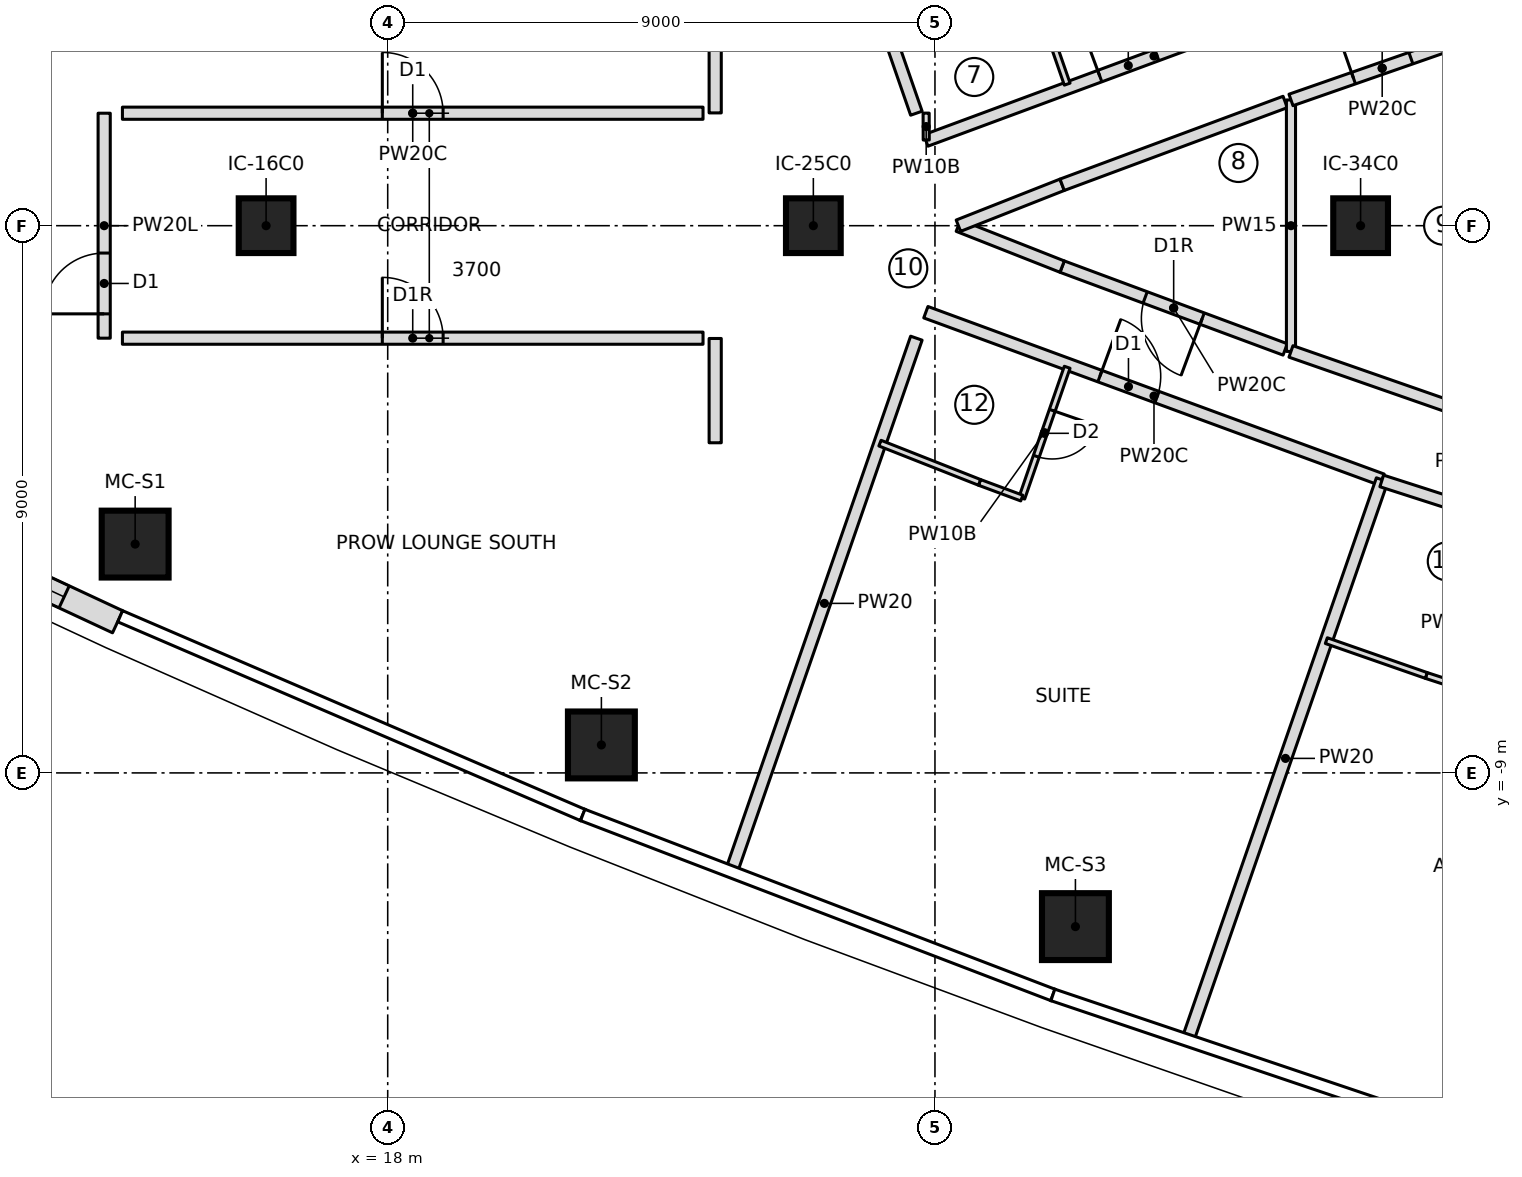
"""IFC4 building model, lengths in metres.
Left out: names, types, materials, properties, quantities, classifications, styles, units other than length and angle.
Written with IfcOpenShell. Run it as: python <this file> out.ifc"""

import sys

from ifc_helpers import new_model, si_unit, direction, frame, frame_2d, origin, origin_2d, place, context, subcontext, project, spatial, polyline, rectangle, outline, extrude, element, fill, save


model = new_model("IFC4")
c1 = context("Model", 3, precision=1e-05, world=origin(), true_north=direction((0.0, 1.0)))
c2 = subcontext(c1, "Body", "Model", "MODEL_VIEW")
j1 = project(units=[si_unit("LENGTHUNIT", "METRE"), si_unit("PLANEANGLEUNIT", "RADIAN")], contexts=[c1])
p1 = place(None, origin())
s1 = spatial("IfcSite", under=j1, at=p1, CompositionType="ELEMENT")
p2 = place(p1, origin())
s2 = spatial("IfcBuilding", under=s1, at=p2, CompositionType="ELEMENT")
p3 = place(p2, frame((0.0, 0.0, 299.85)))
s3 = spatial("IfcBuildingStorey", under=s2, at=p3, CompositionType="ELEMENT", Elevation=299.85)
for number, where, z_axis, x_axis in (
    (1, (13.846, -5.237, 0.0), (0.0, 0.0, 1.0), (1.0, 0.0, 0.0)),
    (2, (21.514, -8.54, 0.0), (0.0, 0.0, 1.0), (1.0, 0.0, 0.0)),
    (3, (29.31, -11.528, 0.0), (0.0, 0.0, 1.0), (1.0, 0.0, 0.0)),
):
    element("IfcColumn", number, at=place(p3, frame(where, z_axis=z_axis, x_axis=x_axis)), inside=s3, PredefinedType="COLUMN", context=c2, shape_type="SweptSolid", body=[
        extrude(rectangle(XDim=1.1, YDim=1.1, at=origin_2d()), origin(), (0.0, 0.0, 1.0), 3.55),
    ])
for number, where, z_axis, x_axis in (
    (4, (16.0, 0.0, 0.0), (0.0, 0.0, 1.0), (1.0, 0.0, 0.0)),
    (5, (25.0, 0.0, 0.0), (0.0, 0.0, 1.0), (1.0, 0.0, 0.0)),
    (6, (34.0, 0.0, 0.0), (0.0, 0.0, 1.0), (1.0, 0.0, 0.0)),
):
    element("IfcColumn", number, at=place(p3, frame(where, z_axis=z_axis, x_axis=x_axis)), inside=s3, PredefinedType="COLUMN", context=c2, shape_type="SweptSolid", body=[
        extrude(rectangle(XDim=0.9, YDim=0.9, at=origin_2d()), origin(), (0.0, 0.0, 1.0), 3.55),
    ])
p4 = place(p3, frame((9.804, -4.766, 0.0), z_axis=(0.0, 0.0, 1.0), x_axis=(0.906485602396, -0.42223672584, 0.0)))
e7 = element("IfcWall", 7, at=p4, inside=s3, PredefinedType="NOTDEFINED", context=c2, shape_type="SweptSolid", body=[
    extrude(outline(polyline([(-0.039, -0.2), (4.142, -0.2), (4.142, 0.2), (0.039, 0.2), (-0.039, -0.2)])), origin(), (0.0, 0.0, 1.0), 3.25),
])
p5 = place(p4, frame((0.971, 0.0, 0.6)))
e8 = element("IfcOpeningElement", 8, at=p5, cuts=e7, PredefinedType="OPENING", context=c2, shape_type="SweptSolid", body=[
    extrude(outline(polyline([(0.0, 1.35), (0.084, 1.771), (0.322, 2.128), (0.679, 2.366), (1.1, 2.45), (1.521, 2.366), (1.878, 2.128), (2.116, 1.771), (2.2, 1.35), (2.2, 1.1), (2.116, 0.679), (1.878, 0.322), (1.521, 0.084), (1.1, 0.0), (0.679, 0.084), (0.322, 0.322), (0.084, 0.679), (0.0, 1.1), (0.0, 1.35)])), frame((0.0, 0.21, 0.0), z_axis=(0.0, -1.0, 0.0), x_axis=(1.0, 0.0, 0.0)), (0.0, 0.0, 1.0), 0.42),
])
p6 = place(p3, frame((13.637, 1.85, 0.0), z_axis=(0.0, 0.0, 1.0), x_axis=(1.0, 0.0, 0.0)))
e9 = element("IfcWall", 9, at=p6, inside=s3, PredefinedType="PARTITIONING", context=c2, shape_type="SweptSolid", body=[
    extrude(rectangle(XDim=9.549, YDim=0.2, at=frame_2d((4.774, 0.0))), origin(), (0.0, 0.0, 1.0), 3.15),
])
p7 = place(p6, frame((4.274, 0.0, 0.0)))
e10 = element("IfcOpeningElement", 10, at=p7, cuts=e9, PredefinedType="OPENING", context=c2, shape_type="SweptSolid", body=[
    extrude(rectangle(XDim=1.0, YDim=2.1, at=frame_2d((0.5, 1.05))), frame((0.0, 0.11, 0.0), z_axis=(0.0, -1.0, 0.0), x_axis=(1.0, 0.0, 0.0)), (0.0, 0.0, 1.0), 0.22),
])
p8 = place(p3, frame((13.637, -1.85, 0.0), z_axis=(0.0, 0.0, 1.0), x_axis=(1.0, 0.0, 0.0)))
e11 = element("IfcWall", 11, at=p8, inside=s3, PredefinedType="PARTITIONING", context=c2, shape_type="SweptSolid", body=[
    extrude(rectangle(XDim=9.549, YDim=0.2, at=frame_2d((4.774, 0.0))), origin(), (0.0, 0.0, 1.0), 3.15),
])
p9 = place(p8, frame((4.274, 0.0, 0.0)))
e12 = element("IfcOpeningElement", 12, at=p9, cuts=e11, PredefinedType="OPENING", context=c2, shape_type="SweptSolid", body=[
    extrude(rectangle(XDim=1.0, YDim=2.1, at=frame_2d((0.5, 1.05))), frame((0.0, 0.11, 0.0), z_axis=(0.0, -1.0, 0.0), x_axis=(1.0, 0.0, 0.0)), (0.0, 0.0, 1.0), 0.22),
])
p10 = place(p3, frame((13.337, -1.85, 0.0), z_axis=(0.0, 0.0, 1.0), x_axis=(0.0, 1.0, 0.0)))
e13 = element("IfcWall", 13, at=p10, inside=s3, PredefinedType="PARTITIONING", context=c2, shape_type="SweptSolid", body=[
    extrude(rectangle(XDim=3.7, YDim=0.2, at=frame_2d((1.85, 0.0))), origin(), (0.0, 0.0, 1.0), 3.15),
])
p11 = place(p10, frame((0.4, 0.0, 0.0)))
e14 = element("IfcOpeningElement", 14, at=p11, cuts=e13, PredefinedType="OPENING", context=c2, shape_type="SweptSolid", body=[
    extrude(rectangle(XDim=1.0, YDim=2.1, at=frame_2d((0.5, 1.05))), frame((0.0, 0.11, 0.0), z_axis=(0.0, -1.0, 0.0), x_axis=(1.0, 0.0, 0.0)), (0.0, 0.0, 1.0), 0.22),
])
p12 = place(p3, frame((26.694, 1.85, 0.0), z_axis=(0.0, 0.0, 1.0), x_axis=(-0.327714422317, 0.944776829418, 0.0)))
e15 = element("IfcWall", 15, at=p12, inside=s3, PredefinedType="PARTITIONING", context=c2, shape_type="SweptSolid", body=[
    extrude(rectangle(XDim=9.233, YDim=0.2, at=frame_2d((4.617, 0.0))), origin(), (0.0, 0.0, 1.0), 3.15),
])
p13 = place(p3, frame((26.85, 1.401, 0.0), z_axis=(0.0, 0.0, 1.0), x_axis=(0.937815361849, 0.34713447982, 0.0)))
e16 = element("IfcWall", 16, at=p13, inside=s3, PredefinedType="PARTITIONING", context=c2, shape_type="SweptSolid", body=[
    extrude(rectangle(XDim=8.001, YDim=0.2, at=frame_2d((4.001, 0.0))), origin(), (0.0, 0.0, 1.0), 3.15),
])
p14 = place(p13, frame((3.05, 0.0, 0.0)))
e17 = element("IfcOpeningElement", 17, at=p14, cuts=e16, PredefinedType="OPENING", context=c2, shape_type="SweptSolid", body=[
    extrude(rectangle(XDim=1.0, YDim=2.1, at=frame_2d((0.5, 1.05))), frame((0.0, 0.11, 0.0), z_axis=(0.0, -1.0, 0.0), x_axis=(1.0, 0.0, 0.0)), (0.0, 0.0, 1.0), 0.22),
])
p15 = place(p3, frame((28.428, 4.48, 0.0), z_axis=(0.0, 0.0, 1.0), x_axis=(0.327718024288, -0.944775579996, 0.0)))
e18 = element("IfcWall", 18, at=p15, inside=s3, PredefinedType="PARTITIONING", context=c2, shape_type="SweptSolid", body=[
    extrude(rectangle(XDim=2.277, YDim=0.1, at=frame_2d((1.139, 0.0))), origin(), (0.0, 0.0, 1.0), 3.15),
])
p16 = place(p15, frame((0.75, 0.0, 0.0)))
e19 = element("IfcOpeningElement", 19, at=p16, cuts=e18, PredefinedType="OPENING", context=c2, shape_type="SweptSolid", body=[
    extrude(rectangle(XDim=0.8, YDim=2.1, at=frame_2d((0.4, 1.05))), frame((0.0, 0.06, 0.0), z_axis=(0.0, -1.0, 0.0), x_axis=(1.0, 0.0, 0.0)), (0.0, 0.0, 1.0), 0.12),
])
p17 = place(p3, frame((23.668, -10.573, 0.0), z_axis=(0.0, 0.0, 1.0), x_axis=(0.327714422317, 0.944776829418, 0.0)))
e20 = element("IfcWall", 20, at=p17, inside=s3, PredefinedType="PARTITIONING", context=c2, shape_type="SweptSolid", body=[
    extrude(rectangle(XDim=9.233, YDim=0.2, at=frame_2d((4.617, 0.0))), origin(), (0.0, 0.0, 1.0), 3.15),
])
p18 = place(p3, frame((26.85, -1.423, 0.0), z_axis=(0.0, 0.0, 1.0), x_axis=(0.938687309179, -0.344769684843, 0.0)))
e21 = element("IfcWall", 21, at=p18, inside=s3, PredefinedType="PARTITIONING", context=c2, shape_type="SweptSolid", body=[
    extrude(rectangle(XDim=7.994, YDim=0.2, at=frame_2d((3.997, 0.0))), origin(), (0.0, 0.0, 1.0), 3.15),
])
p19 = place(p18, frame((3.05, 0.0, 0.0)))
e22 = element("IfcOpeningElement", 22, at=p19, cuts=e21, PredefinedType="OPENING", context=c2, shape_type="SweptSolid", body=[
    extrude(rectangle(XDim=1.0, YDim=2.1, at=frame_2d((0.5, 1.05))), frame((0.0, 0.11, 0.0), z_axis=(0.0, -1.0, 0.0), x_axis=(1.0, 0.0, 0.0)), (0.0, 0.0, 1.0), 0.22),
])
p20 = place(p3, frame((29.175, -2.328, 0.0), z_axis=(0.0, 0.0, 1.0), x_axis=(-0.327718024288, -0.944775579996, 0.0)))
e23 = element("IfcWall", 23, at=p20, inside=s3, PredefinedType="PARTITIONING", context=c2, shape_type="SweptSolid", body=[
    extrude(rectangle(XDim=2.277, YDim=0.1, at=frame_2d((1.139, 0.0))), origin(), (0.0, 0.0, 1.0), 3.15),
])
p21 = place(p20, frame((0.75, 0.0, 0.0)))
e24 = element("IfcOpeningElement", 24, at=p21, cuts=e23, PredefinedType="OPENING", context=c2, shape_type="SweptSolid", body=[
    extrude(rectangle(XDim=0.8, YDim=2.1, at=frame_2d((0.4, 1.05))), frame((0.0, 0.06, 0.0), z_axis=(0.0, -1.0, 0.0), x_axis=(1.0, 0.0, 0.0)), (0.0, 0.0, 1.0), 0.12),
])
p22 = place(p3, frame((28.428, -4.48, 0.0), z_axis=(0.0, 0.0, 1.0), x_axis=(-0.937514267289, 0.347946833049, 0.0)))
e25 = element("IfcWall", 25, at=p22, inside=s3, PredefinedType="PARTITIONING", context=c2, shape_type="SweptSolid", body=[
    extrude(rectangle(XDim=0.742, YDim=0.1, at=frame_2d((0.371, 0.0))), origin(), (0.0, 0.0, 1.0), 3.15),
])
p23 = place(p3, frame((27.733, -4.222, 0.0), z_axis=(0.0, 0.0, 1.0), x_axis=(-0.930254925629, 0.366913850028, 0.0)))
e26 = element("IfcWall", 26, at=p23, inside=s3, PredefinedType="PARTITIONING", context=c2, shape_type="SweptSolid", body=[
    extrude(rectangle(XDim=1.76, YDim=0.1, at=frame_2d((0.88, 0.0))), origin(), (0.0, 0.0, 1.0), 3.15),
])
p24 = place(p3, frame((31.175, -13.344, 0.0), z_axis=(0.0, 0.0, 1.0), x_axis=(0.327696596093, 0.944783012606, 0.0)))
e27 = element("IfcWall", 27, at=p24, inside=s3, PredefinedType="PARTITIONING", context=c2, shape_type="SweptSolid", body=[
    extrude(rectangle(XDim=9.7, YDim=0.2, at=frame_2d((4.85, 0.0))), origin(), (0.0, 0.0, 1.0), 3.15),
])
p25 = place(p3, frame((34.347, -4.198, 0.0), z_axis=(0.0, 0.0, 1.0), x_axis=(0.951959334907, -0.306224467805, 0.0)))
e28 = element("IfcWall", 28, at=p25, inside=s3, PredefinedType="PARTITIONING", context=c2, shape_type="SweptSolid", body=[
    extrude(rectangle(XDim=8.002, YDim=0.2, at=frame_2d((4.001, 0.0))), origin(), (0.0, 0.0, 1.0), 3.15),
])
p26 = place(p25, frame((3.7, 0.0, 0.0)))
e29 = element("IfcOpeningElement", 29, at=p26, cuts=e28, PredefinedType="OPENING", context=c2, shape_type="SweptSolid", body=[
    extrude(rectangle(XDim=1.0, YDim=2.1, at=frame_2d((0.5, 1.05))), frame((0.0, 0.11, 0.0), z_axis=(0.0, -1.0, 0.0), x_axis=(1.0, 0.0, 0.0)), (0.0, 0.0, 1.0), 0.22),
])
p27 = place(p3, frame((36.468, -7.85, 0.0), z_axis=(0.0, 0.0, 1.0), x_axis=(-0.95070411494, 0.310099477322, 0.0)))
e30 = element("IfcWall", 30, at=p27, inside=s3, PredefinedType="PARTITIONING", context=c2, shape_type="SweptSolid", body=[
    extrude(rectangle(XDim=1.46, YDim=0.1, at=frame_2d((0.73, 0.0))), origin(), (0.0, 0.0, 1.0), 3.15),
])
p28 = place(p3, frame((35.08, -7.397, 0.0), z_axis=(0.0, 0.0, 1.0), x_axis=(-0.944260018318, 0.329200573825, 0.0)))
e31 = element("IfcWall", 31, at=p28, inside=s3, PredefinedType="PARTITIONING", context=c2, shape_type="SweptSolid", body=[
    extrude(rectangle(XDim=1.74, YDim=0.1, at=frame_2d((0.87, 0.0))), origin(), (0.0, 0.0, 1.0), 3.15),
])
p29 = place(p3, frame((32.76, -2.035, 0.0), z_axis=(0.0, 0.0, 1.0), x_axis=(-0.937460178932, 0.348092534992, 0.0)))
e32 = element("IfcWall", 32, at=p29, inside=s3, PredefinedType="PARTITIONING", context=c2, shape_type="SweptSolid", body=[
    extrude(rectangle(XDim=3.913, YDim=0.2, at=frame_2d((1.957, 0.0))), origin(), (0.0, 0.0, 1.0), 3.15),
])
p30 = place(p29, frame((1.457, 0.0, 0.0)))
e33 = element("IfcOpeningElement", 33, at=p30, cuts=e32, PredefinedType="OPENING", context=c2, shape_type="SweptSolid", body=[
    extrude(rectangle(XDim=1.0, YDim=2.1, at=frame_2d((0.5, 1.05))), frame((0.0, 0.11, 0.0), z_axis=(0.0, -1.0, 0.0), x_axis=(1.0, 0.0, 0.0)), (0.0, 0.0, 1.0), 0.22),
])
for number, where, z_axis, x_axis in (
    (34, (29.092, -0.673, 0.0), (0.0, 0.0, 1.0), (-0.93, 0.367, 0.0)),
    (35, (27.385, 0.0, 0.0), (0.0, 0.0, 1.0), (0.93, 0.367, 0.0)),
):
    element("IfcWall", number, at=place(p3, frame(where, z_axis=z_axis, x_axis=x_axis)), inside=s3, PredefinedType="PARTITIONING", context=c2, shape_type="SweptSolid", body=[
        extrude(rectangle(XDim=1.834, YDim=0.2, at=frame_2d((0.917, 0.0))), origin(), (0.0, 0.0, 1.0), 3.15),
    ])
p31 = place(p3, frame((29.092, 0.673, 0.0), z_axis=(0.0, 0.0, 1.0), x_axis=(0.937460178932, 0.348092534992, 0.0)))
e36 = element("IfcWall", 36, at=p31, inside=s3, PredefinedType="PARTITIONING", context=c2, shape_type="SweptSolid", body=[
    extrude(rectangle(XDim=3.913, YDim=0.2, at=frame_2d((1.957, 0.0))), origin(), (0.0, 0.0, 1.0), 3.15),
])
p32 = place(p3, frame((32.855, -2.068, 0.0), z_axis=(0.0, 0.0, 1.0), x_axis=(0.0, 1.0, 0.0)))
e37 = element("IfcWall", 37, at=p32, inside=s3, PredefinedType="PARTITIONING", context=c2, shape_type="SweptSolid", body=[
    extrude(rectangle(XDim=4.136, YDim=0.15, at=frame_2d((2.068, 0.0))), origin(), (0.0, 0.0, 1.0), 3.15),
])
p33 = place(p3, frame((32.855, 2.068, 0.0), z_axis=(0.0, 0.0, 1.0), x_axis=(0.944260188635, 0.329200085296, 0.0)))
e38 = element("IfcWall", 38, at=p33, inside=s3, PredefinedType="PARTITIONING", context=c2, shape_type="SweptSolid", body=[
    extrude(rectangle(XDim=3.177, YDim=0.2, at=frame_2d((1.588, 0.0))), origin(), (0.0, 0.0, 1.0), 3.15),
])
p34 = place(p33, frame((1.088, 0.0, 0.0)))
e39 = element("IfcOpeningElement", 39, at=p34, cuts=e38, PredefinedType="OPENING", context=c2, shape_type="SweptSolid", body=[
    extrude(rectangle(XDim=1.0, YDim=2.1, at=frame_2d((0.5, 1.05))), frame((0.0, 0.11, 0.0), z_axis=(0.0, -1.0, 0.0), x_axis=(1.0, 0.0, 0.0)), (0.0, 0.0, 1.0), 0.22),
])
p35 = place(p3, frame((35.855, -3.114, 0.0), z_axis=(0.0, 0.0, 1.0), x_axis=(-0.944260188635, 0.329200085296, 0.0)))
e40 = element("IfcWall", 40, at=p35, inside=s3, PredefinedType="PARTITIONING", context=c2, shape_type="SweptSolid", body=[
    extrude(rectangle(XDim=3.177, YDim=0.2, at=frame_2d((1.588, 0.0))), origin(), (0.0, 0.0, 1.0), 3.15),
])
p36 = place(p3, frame((26.856, 1.409, 0.0), z_axis=(0.0, 0.0, 1.0), x_axis=(-0.003863105832, 0.999992538179, 0.0)))
e41 = element("IfcWall", 41, at=p36, inside=s3, PredefinedType="PARTITIONING", context=c2, shape_type="SweptSolid", body=[
    extrude(rectangle(XDim=0.442, YDim=0.1, at=frame_2d((0.221, 0.0))), origin(), (0.0, 0.0, 1.0), 3.15),
])
p37 = place(p3, frame((23.386, 3.58, 0.0), z_axis=(0.0, 0.0, 1.0), x_axis=(0.0, -1.0, 0.0)))
e42 = element("IfcWall", 42, at=p37, inside=s3, PredefinedType="PARTITIONING", context=c2, shape_type="SweptSolid", body=[
    extrude(rectangle(XDim=1.725, YDim=0.2, at=frame_2d((0.863, 0.0))), origin(), (0.0, 0.0, 1.0), 3.15),
])
p38 = place(p3, frame((23.386, -1.855, 0.0), z_axis=(0.0, 0.0, 1.0), x_axis=(0.0, -1.0, 0.0)))
e43 = element("IfcWall", 43, at=p38, inside=s3, PredefinedType="PARTITIONING", context=c2, shape_type="SweptSolid", body=[
    extrude(rectangle(XDim=1.715, YDim=0.2, at=frame_2d((0.858, 0.0))), origin(), (0.0, 0.0, 1.0), 3.15),
])
p39 = place(p5, origin())
e44 = element("IfcWindow", 44, at=p39, inside=s3, PartitioningType="SINGLE_PANEL", PredefinedType="WINDOW", context=c2, shape_type="SweptSolid", body=[
    extrude(outline(polyline([(0.0, 1.35), (0.084, 1.771), (0.322, 2.128), (0.679, 2.366), (1.1, 2.45), (1.521, 2.366), (1.878, 2.128), (2.116, 1.771), (2.2, 1.35), (2.2, 1.1), (2.116, 0.679), (1.878, 0.322), (1.521, 0.084), (1.1, 0.0), (0.679, 0.084), (0.322, 0.322), (0.084, 0.679), (0.0, 1.1), (0.0, 1.35)])), frame((0.0, 0.17, 0.0), z_axis=(0.0, -1.0, 0.0), x_axis=(1.0, 0.0, 0.0)), (0.0, 0.0, 1.0), 0.06),
])
fill(e8, e44)
p40 = place(p7, origin())
e45 = element("IfcDoor", 45, at=p40, inside=s3, OperationType="SINGLE_SWING_LEFT", PredefinedType="DOOR", context=c2, shape_type="SweptSolid", body=[
    extrude(rectangle(XDim=1.0, YDim=2.1, at=frame_2d((0.5, 1.05))), frame((0.0, 0.025, 0.0), z_axis=(0.0, -1.0, 0.0), x_axis=(1.0, 0.0, 0.0)), (0.0, 0.0, 1.0), 0.05),
])
fill(e10, e45)
p41 = place(p9, origin())
e46 = element("IfcDoor", 46, at=p41, inside=s3, OperationType="SINGLE_SWING_RIGHT", PredefinedType="DOOR", context=c2, shape_type="SweptSolid", body=[
    extrude(rectangle(XDim=1.0, YDim=2.1, at=frame_2d((0.5, 1.05))), frame((0.0, 0.025, 0.0), z_axis=(0.0, -1.0, 0.0), x_axis=(1.0, 0.0, 0.0)), (0.0, 0.0, 1.0), 0.05),
])
fill(e12, e46)
p42 = place(p11, origin())
e47 = element("IfcDoor", 47, at=p42, inside=s3, OperationType="SINGLE_SWING_LEFT", PredefinedType="DOOR", context=c2, shape_type="SweptSolid", body=[
    extrude(rectangle(XDim=1.0, YDim=2.1, at=frame_2d((0.5, 1.05))), frame((0.0, 0.025, 0.0), z_axis=(0.0, -1.0, 0.0), x_axis=(1.0, 0.0, 0.0)), (0.0, 0.0, 1.0), 0.05),
])
fill(e14, e47)
p43 = place(p14, origin())
e48 = element("IfcDoor", 48, at=p43, inside=s3, OperationType="SINGLE_SWING_LEFT", PredefinedType="DOOR", context=c2, shape_type="SweptSolid", body=[
    extrude(rectangle(XDim=1.0, YDim=2.1, at=frame_2d((0.5, 1.05))), frame((0.0, 0.025, 0.0), z_axis=(0.0, -1.0, 0.0), x_axis=(1.0, 0.0, 0.0)), (0.0, 0.0, 1.0), 0.05),
])
fill(e17, e48)
p44 = place(p21, origin())
e49 = element("IfcDoor", 49, at=p44, inside=s3, OperationType="SINGLE_SWING_LEFT", PredefinedType="DOOR", context=c2, shape_type="SweptSolid", body=[
    extrude(rectangle(XDim=0.8, YDim=2.1, at=frame_2d((0.4, 1.05))), frame((0.0, 0.025, 0.0), z_axis=(0.0, -1.0, 0.0), x_axis=(1.0, 0.0, 0.0)), (0.0, 0.0, 1.0), 0.05),
])
fill(e24, e49)
p45 = place(p19, origin())
e50 = element("IfcDoor", 50, at=p45, inside=s3, OperationType="SINGLE_SWING_LEFT", PredefinedType="DOOR", context=c2, shape_type="SweptSolid", body=[
    extrude(rectangle(XDim=1.0, YDim=2.1, at=frame_2d((0.5, 1.05))), frame((0.0, 0.025, 0.0), z_axis=(0.0, -1.0, 0.0), x_axis=(1.0, 0.0, 0.0)), (0.0, 0.0, 1.0), 0.05),
])
fill(e22, e50)
p46 = place(p30, origin())
e51 = element("IfcDoor", 51, at=p46, inside=s3, OperationType="SINGLE_SWING_RIGHT", PredefinedType="DOOR", context=c2, shape_type="SweptSolid", body=[
    extrude(rectangle(XDim=1.0, YDim=2.1, at=frame_2d((0.5, 1.05))), frame((0.0, 0.025, 0.0), z_axis=(0.0, -1.0, 0.0), x_axis=(1.0, 0.0, 0.0)), (0.0, 0.0, 1.0), 0.05),
])
fill(e33, e51)
p47 = place(p34, origin())
e52 = element("IfcDoor", 52, at=p47, inside=s3, OperationType="SINGLE_SWING_LEFT", PredefinedType="DOOR", context=c2, shape_type="SweptSolid", body=[
    extrude(rectangle(XDim=1.0, YDim=2.1, at=frame_2d((0.5, 1.05))), frame((0.0, 0.025, 0.0), z_axis=(0.0, -1.0, 0.0), x_axis=(1.0, 0.0, 0.0)), (0.0, 0.0, 1.0), 0.05),
])
fill(e39, e52)
save(model, sys.argv[1])
